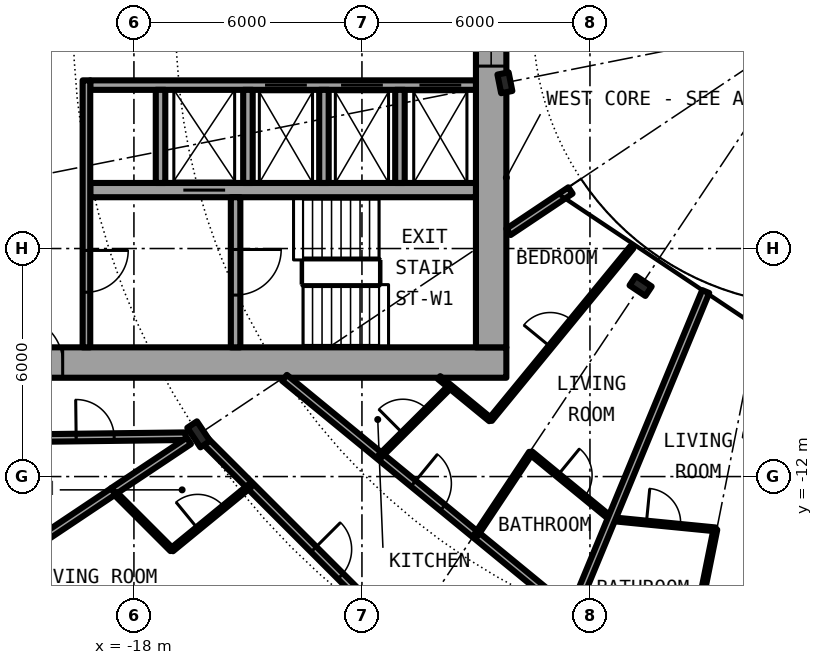
"""IFC4 building model, lengths in metres.
Left out: names, types, materials, properties, quantities, classifications, styles, units other than length and angle.
Written with IfcOpenShell. Run it as: python <this file> out.ifc"""

import sys

from ifc_helpers import new_model, si_unit, direction, frame, frame_2d, origin, origin_2d, place, context, subcontext, project, spatial, rectangle, i_section, extrude, element, fill, save


model = new_model("IFC4")
c1 = context("Model", 3, precision=1e-05, world=origin(), true_north=direction((0.0, 1.0)))
c2 = subcontext(c1, "Body", "Model", "MODEL_VIEW")
j1 = project(units=[si_unit("LENGTHUNIT", "METRE"), si_unit("PLANEANGLEUNIT", "RADIAN")], contexts=[c1])
p1 = place(None, origin())
s1 = spatial("IfcSite", under=j1, at=p1, CompositionType="ELEMENT")
p2 = place(p1, origin())
s2 = spatial("IfcBuilding", under=s1, at=p2, CompositionType="ELEMENT")
p3 = place(p2, frame((0.0, 0.0, 22.8)))
s3 = spatial("IfcBuildingStorey", under=s2, at=p3, CompositionType="ELEMENT", Elevation=22.8)
p4 = place(p3, frame((-16.297, -10.889, 0.0), z_axis=(0.0, 0.0, 1.0), x_axis=(-0.831469612303, -0.55557023302, 0.0)))
e1 = element("IfcColumn", 1, at=p4, inside=s3, PredefinedType="COLUMN", context=c2, shape_type="SweptSolid", body=[
    extrude(i_section(OverallWidth=0.305, OverallDepth=0.62, WebThickness=0.021, FlangeThickness=0.04, FilletRadius=0.027, at=origin_2d()), origin(), (0.0, 0.0, 1.0), 3.05),
])
for number, where, z_axis, x_axis in (
    (2, (-8.239, -1.639, 0.0), (0.0, 0.0, 1.0), (-0.981, -0.195, 0.0)),
    (3, (-4.667, -6.984, 0.0), (0.0, 0.0, 1.0), (-0.556, -0.831, 0.0)),
):
    element("IfcColumn", number, at=place(p3, frame(where, z_axis=z_axis, x_axis=x_axis)), inside=s3, PredefinedType="COLUMN", context=c2, shape_type="SweptSolid", body=[
        extrude(i_section(OverallWidth=0.3, OverallDepth=0.5, WebThickness=0.014, FlangeThickness=0.028, FilletRadius=0.027, at=origin_2d()), origin(), (0.0, 0.0, 1.0), 3.05),
    ])
p5 = place(p3, frame((-22.4, -9.0, 0.0), z_axis=(0.0, 0.0, 1.0), x_axis=(1.0, 0.0, 0.0)))
e4 = element("IfcWall", 4, at=p5, inside=s3, PredefinedType="SHEAR", context=c2, shape_type="SweptSolid", body=[
    extrude(rectangle(XDim=14.2, YDim=0.8, at=frame_2d((7.1, 0.0))), origin(), (0.0, 0.0, 1.0), 3.05),
])
p6 = place(p5, frame((1.325, 0.0, 0.0)))
e5 = element("IfcOpeningElement", 5, at=p6, cuts=e4, PredefinedType="OPENING", context=c2, shape_type="SweptSolid", body=[
    extrude(rectangle(XDim=1.2, YDim=2.3, at=frame_2d((0.6, 1.15))), frame((0.0, 0.41, 0.0), z_axis=(0.0, -1.0, 0.0), x_axis=(1.0, 0.0, 0.0)), (0.0, 0.0, 1.0), 0.82),
])
p7 = place(p3, frame((-8.6, 8.6, 0.0), z_axis=(0.0, 0.0, 1.0), x_axis=(0.0, -1.0, 0.0)))
e6 = element("IfcWall", 6, at=p7, inside=s3, PredefinedType="SHEAR", context=c2, shape_type="SweptSolid", body=[
    extrude(rectangle(XDim=17.2, YDim=0.8, at=frame_2d((8.6, 0.0))), origin(), (0.0, 0.0, 1.0), 3.05),
])
p8 = place(p7, frame((7.4, 0.0, 0.1)))
e7 = element("IfcOpeningElement", 7, at=p8, cuts=e6, PredefinedType="OPENING", context=c2, shape_type="SweptSolid", body=[
    extrude(rectangle(XDim=2.4, YDim=2.2, at=frame_2d((1.2, 1.1))), frame((0.0, 0.41, 0.0), z_axis=(0.0, -1.0, 0.0), x_axis=(1.0, 0.0, 0.0)), (0.0, 0.0, 1.0), 0.82),
])
p9 = place(p3, frame((-9.0, -1.7, 0.0), z_axis=(0.0, 0.0, 1.0), x_axis=(-1.0, 0.0, 0.0)))
e8 = element("IfcWall", 8, at=p9, inside=s3, PredefinedType="SHEAR", context=c2, shape_type="SweptSolid", body=[
    extrude(rectangle(XDim=10.15, YDim=0.25, at=frame_2d((5.075, 0.0))), origin(), (0.0, 0.0, 1.0), 3.05),
])
p10 = place(p9, frame((0.387, 0.0, 0.0)))
e9 = element("IfcOpeningElement", 9, at=p10, cuts=e8, PredefinedType="OPENING", context=c2, shape_type="SweptSolid", body=[
    extrude(rectangle(XDim=1.1, YDim=2.3, at=frame_2d((0.55, 1.15))), frame((0.0, 0.135, 0.0), z_axis=(0.0, -1.0, 0.0), x_axis=(1.0, 0.0, 0.0)), (0.0, 0.0, 1.0), 0.27),
])
p11 = place(p9, frame((2.45, 0.0, 0.0)))
e10 = element("IfcOpeningElement", 10, at=p11, cuts=e8, PredefinedType="OPENING", context=c2, shape_type="SweptSolid", body=[
    extrude(rectangle(XDim=1.1, YDim=2.3, at=frame_2d((0.55, 1.15))), frame((0.0, 0.135, 0.0), z_axis=(0.0, -1.0, 0.0), x_axis=(1.0, 0.0, 0.0)), (0.0, 0.0, 1.0), 0.27),
])
p12 = place(p9, frame((4.45, 0.0, 0.0)))
e11 = element("IfcOpeningElement", 11, at=p12, cuts=e8, PredefinedType="OPENING", context=c2, shape_type="SweptSolid", body=[
    extrude(rectangle(XDim=1.1, YDim=2.3, at=frame_2d((0.55, 1.15))), frame((0.0, 0.135, 0.0), z_axis=(0.0, -1.0, 0.0), x_axis=(1.0, 0.0, 0.0)), (0.0, 0.0, 1.0), 0.27),
])
p13 = place(p3, frame((-9.0, -4.462, 0.0), z_axis=(0.0, 0.0, 1.0), x_axis=(-1.0, 0.0, 0.0)))
e12 = element("IfcWall", 12, at=p13, inside=s3, PredefinedType="SHEAR", context=c2, shape_type="SweptSolid", body=[
    extrude(rectangle(XDim=10.15, YDim=0.375, at=frame_2d((5.075, 0.0))), origin(), (0.0, 0.0, 1.0), 3.05),
])
p14 = place(p13, frame((6.6, 0.0, 0.0)))
e13 = element("IfcOpeningElement", 13, at=p14, cuts=e12, PredefinedType="OPENING", context=c2, shape_type="SweptSolid", body=[
    extrude(rectangle(XDim=1.1, YDim=2.3, at=frame_2d((0.55, 1.15))), frame((0.0, 0.198, 0.0), z_axis=(0.0, -1.0, 0.0), x_axis=(1.0, 0.0, 0.0)), (0.0, 0.0, 1.0), 0.395),
])
p15 = place(p3, frame((-15.325, -4.65, 0.0), z_axis=(0.0, 0.0, 1.0), x_axis=(0.0, -1.0, 0.0)))
e14 = element("IfcWall", 14, at=p15, inside=s3, PredefinedType="SHEAR", context=c2, shape_type="SweptSolid", body=[
    extrude(rectangle(XDim=3.95, YDim=0.25, at=frame_2d((1.975, 0.0))), origin(), (0.0, 0.0, 1.0), 3.05),
])
p16 = place(p15, frame((1.375, 0.0, 0.0)))
e15 = element("IfcOpeningElement", 15, at=p16, cuts=e14, PredefinedType="OPENING", context=c2, shape_type="SweptSolid", body=[
    extrude(rectangle(XDim=1.2, YDim=2.3, at=frame_2d((0.6, 1.15))), frame((0.0, 0.135, 0.0), z_axis=(0.0, -1.0, 0.0), x_axis=(1.0, 0.0, 0.0)), (0.0, 0.0, 1.0), 0.27),
])
for number, where, z_axis, x_axis in (
    (16, (-15.0, -1.825, 0.0), (0.0, 0.0, 1.0), (0.0, -1.0, 0.0)),
    (17, (-17.3, -1.825, 0.0), (0.0, 0.0, 1.0), (0.0, -1.0, 0.0)),
):
    element("IfcWall", number, at=place(p3, frame(where, z_axis=z_axis, x_axis=x_axis)), inside=s3, PredefinedType="SOLIDWALL", context=c2, shape_type="SweptSolid", body=[
        extrude(rectangle(XDim=2.45, YDim=0.25, at=frame_2d((1.225, 0.0))), origin(), (0.0, 0.0, 1.0), 2.7),
    ])
p17 = place(p3, frame((-19.25, -1.575, 0.0), z_axis=(0.0, 0.0, 1.0), x_axis=(0.0, -1.0, 0.0)))
e18 = element("IfcWall", 18, at=p17, inside=s3, PredefinedType="SOLIDWALL", context=c2, shape_type="SweptSolid", body=[
    extrude(rectangle(XDim=7.025, YDim=0.2, at=frame_2d((3.513, 0.0))), origin(), (0.0, 0.0, 1.0), 2.7),
])
p18 = place(p17, frame((4.475, 0.0, 0.0)))
e19 = element("IfcOpeningElement", 19, at=p18, cuts=e18, PredefinedType="OPENING", context=c2, shape_type="SweptSolid", body=[
    extrude(rectangle(XDim=1.1, YDim=2.3, at=frame_2d((0.55, 1.15))), frame((0.0, 0.11, 0.0), z_axis=(0.0, -1.0, 0.0), x_axis=(1.0, 0.0, 0.0)), (0.0, 0.0, 1.0), 0.22),
])
for number, where, z_axis, x_axis in (
    (20, (-11.0, -1.825, 0.0), (0.0, 0.0, 1.0), (0.0, -1.0, 0.0)),
    (21, (-13.0, -1.825, 0.0), (0.0, 0.0, 1.0), (0.0, -1.0, 0.0)),
):
    element("IfcWall", number, at=place(p3, frame(where, z_axis=z_axis, x_axis=x_axis)), inside=s3, PredefinedType="SOLIDWALL", context=c2, shape_type="SweptSolid", body=[
        extrude(rectangle(XDim=2.45, YDim=0.25, at=frame_2d((1.225, 0.0))), origin(), (0.0, 0.0, 1.0), 2.7),
    ])
p19 = place(p3, frame((-18.542, -12.389, 0.0), z_axis=(0.0, 0.0, 1.0), x_axis=(0.707106781187, -0.707106781187, 0.0)))
e22 = element("IfcWall", 22, at=p19, inside=s3, PredefinedType="PARTITIONING", context=c2, shape_type="SweptSolid", body=[
    extrude(rectangle(XDim=2.175, YDim=0.1, at=frame_2d((1.088, 0.0))), origin(), (0.0, 0.0, 1.0), 2.7),
])
p20 = place(p3, frame((-16.187, -10.999, 0.0), z_axis=(0.0, 0.0, 1.0), x_axis=(0.707106781187, -0.707106781187, 0.0)))
e23 = element("IfcWall", 23, at=p20, inside=s3, PredefinedType="PARTITIONING", context=c2, shape_type="SweptSolid", body=[
    extrude(rectangle(XDim=7.337, YDim=0.2, at=frame_2d((3.668, 0.0))), origin(), (0.0, 0.0, 1.0), 2.38),
])
p21 = place(p20, frame((4.124, 0.0, 0.0)))
e24 = element("IfcOpeningElement", 24, at=p21, cuts=e23, PredefinedType="OPENING", context=c2, shape_type="SweptSolid", body=[
    extrude(rectangle(XDim=1.0, YDim=2.3, at=frame_2d((0.5, 1.15))), frame((0.0, 0.11, 0.0), z_axis=(0.0, -1.0, 0.0), x_axis=(1.0, 0.0, 0.0)), (0.0, 0.0, 1.0), 0.22),
])
p22 = place(p3, frame((-14.038, -9.402, 0.0), z_axis=(0.0, 0.0, 1.0), x_axis=(0.773084654695, -0.634302858794, 0.0)))
e25 = element("IfcWall", 25, at=p22, inside=s3, PredefinedType="PARTITIONING", context=c2, shape_type="SweptSolid", body=[
    extrude(rectangle(XDim=9.793, YDim=0.2, at=frame_2d((4.896, 0.0))), origin(), (0.0, 0.0, 1.0), 2.7),
])
p23 = place(p22, frame((4.387, 0.0, 0.0)))
e26 = element("IfcOpeningElement", 26, at=p23, cuts=e25, PredefinedType="OPENING", context=c2, shape_type="SweptSolid", body=[
    extrude(rectangle(XDim=1.0, YDim=2.3, at=frame_2d((0.5, 1.15))), frame((0.0, 0.11, 0.0), z_axis=(0.0, -1.0, 0.0), x_axis=(1.0, 0.0, 0.0)), (0.0, 0.0, 1.0), 0.22),
])
p24 = place(p3, frame((-9.971, -9.396, 0.0), z_axis=(0.0, 0.0, 1.0), x_axis=(0.77321028337, -0.634149712363, 0.0)))
e27 = element("IfcWall", 27, at=p24, inside=s3, PredefinedType="PARTITIONING", context=c2, shape_type="SweptSolid", body=[
    extrude(rectangle(XDim=1.749, YDim=0.1, at=frame_2d((0.874, 0.0))), origin(), (0.0, 0.0, 1.0), 2.7),
])
p25 = place(p3, frame((-7.558, -11.376, 0.0), z_axis=(0.0, 0.0, 1.0), x_axis=(0.773049907698, -0.634345205868, 0.0)))
e28 = element("IfcWall", 28, at=p25, inside=s3, PredefinedType="PARTITIONING", context=c2, shape_type="SweptSolid", body=[
    extrude(rectangle(XDim=2.748, YDim=0.1, at=frame_2d((1.374, 0.0))), origin(), (0.0, 0.0, 1.0), 2.7),
])
p26 = place(p25, frame((0.924, 0.0, 0.0)))
e29 = element("IfcOpeningElement", 29, at=p26, cuts=e28, PredefinedType="OPENING", context=c2, shape_type="SweptSolid", body=[
    extrude(rectangle(XDim=0.9, YDim=2.3, at=frame_2d((0.45, 1.15))), frame((0.0, 0.06, 0.0), z_axis=(0.0, -1.0, 0.0), x_axis=(1.0, 0.0, 0.0)), (0.0, 0.0, 1.0), 0.12),
])
p27 = place(p3, frame((-5.434, -13.12, 0.0), z_axis=(0.0, 0.0, 1.0), x_axis=(0.99520549403, -0.097806056318, 0.0)))
e30 = element("IfcWall", 30, at=p27, inside=s3, PredefinedType="PARTITIONING", context=c2, shape_type="SweptSolid", body=[
    extrude(rectangle(XDim=2.748, YDim=0.1, at=frame_2d((1.374, 0.0))), origin(), (0.0, 0.0, 1.0), 2.7),
])
p28 = place(p27, frame((0.924, 0.0, 0.0)))
e31 = element("IfcOpeningElement", 31, at=p28, cuts=e30, PredefinedType="OPENING", context=c2, shape_type="SweptSolid", body=[
    extrude(rectangle(XDim=0.9, YDim=2.3, at=frame_2d((0.45, 1.15))), frame((0.0, 0.06, 0.0), z_axis=(0.0, -1.0, 0.0), x_axis=(1.0, 0.0, 0.0)), (0.0, 0.0, 1.0), 0.12),
])
p29 = place(p3, frame((-21.675, -11.0, 0.0), z_axis=(0.0, 0.0, 1.0), x_axis=(0.99992425795, 0.012307654658, 0.0)))
e32 = element("IfcWall", 32, at=p29, inside=s3, PredefinedType="PARTITIONING", context=c2, shape_type="SweptSolid", body=[
    extrude(rectangle(XDim=5.039, YDim=0.2, at=frame_2d((2.519, 0.0))), origin(), (0.0, 0.0, 1.0), 2.7),
])
p30 = place(p29, frame((2.155, 0.0, 0.0)))
e33 = element("IfcOpeningElement", 33, at=p30, cuts=e32, PredefinedType="OPENING", context=c2, shape_type="SweptSolid", body=[
    extrude(rectangle(XDim=1.0, YDim=2.3, at=frame_2d((0.5, 1.15))), frame((0.0, 0.11, 0.0), z_axis=(0.0, -1.0, 0.0), x_axis=(1.0, 0.0, 0.0)), (0.0, 0.0, 1.0), 0.22),
])
p31 = place(p3, frame((-6.513, -4.472, 0.0), z_axis=(0.0, 0.0, 1.0), x_axis=(-0.831417956244, -0.555647533996, 0.0)))
e34 = element("IfcWall", 34, at=p31, inside=s3, PredefinedType="PARTITIONING", context=c2, shape_type="SweptSolid", body=[
    extrude(rectangle(XDim=1.962, YDim=0.2, at=frame_2d((0.981, 0.0))), origin(), (0.0, 0.0, 1.0), 2.7),
])
p32 = place(p3, frame((-18.544, -12.387, 0.0), z_axis=(0.0, 0.0, 1.0), x_axis=(0.832066006555, 0.554676627176, 0.0)))
e35 = element("IfcWall", 35, at=p32, inside=s3, PredefinedType="PARTITIONING", context=c2, shape_type="SweptSolid", body=[
    extrude(rectangle(XDim=2.39, YDim=0.2, at=frame_2d((1.195, 0.0))), origin(), (0.0, 0.0, 1.0), 2.7),
])
p33 = place(p3, frame((-22.595, -15.098, 0.0), z_axis=(0.0, 0.0, 1.0), x_axis=(0.831387096605, 0.55569370664, 0.0)))
e36 = element("IfcWall", 36, at=p33, inside=s3, PredefinedType="PARTITIONING", context=c2, shape_type="SweptSolid", body=[
    extrude(rectangle(XDim=4.875, YDim=0.2, at=frame_2d((2.438, 0.0))), origin(), (0.0, 0.0, 1.0), 2.7),
])
p34 = place(p3, frame((-17.004, -13.927, 0.0), z_axis=(0.0, 0.0, 1.0), x_axis=(0.77367517848, 0.633582447834, 0.0)))
e37 = element("IfcWall", 37, at=p34, inside=s3, PredefinedType="PARTITIONING", context=c2, shape_type="SweptSolid", body=[
    extrude(rectangle(XDim=2.661, YDim=0.1, at=frame_2d((1.331, 0.0))), origin(), (0.0, 0.0, 1.0), 2.7),
])
p35 = place(p34, frame((0.881, 0.0, 0.0)))
e38 = element("IfcOpeningElement", 38, at=p35, cuts=e37, PredefinedType="OPENING", context=c2, shape_type="SweptSolid", body=[
    extrude(rectangle(XDim=0.9, YDim=2.3, at=frame_2d((0.45, 1.15))), frame((0.0, 0.06, 0.0), z_axis=(0.0, -1.0, 0.0), x_axis=(1.0, 0.0, 0.0)), (0.0, 0.0, 1.0), 0.12),
])
p36 = place(p3, frame((-11.524, -11.464, 0.0), z_axis=(0.0, 0.0, 1.0), x_axis=(0.708796844581, 0.705412668665, 0.0)))
e39 = element("IfcWall", 39, at=p36, inside=s3, PredefinedType="PARTITIONING", context=c2, shape_type="SweptSolid", body=[
    extrude(rectangle(XDim=2.597, YDim=0.1, at=frame_2d((1.299, 0.0))), origin(), (0.0, 0.0, 1.0), 2.7),
])
p37 = place(p36, frame((0.849, 0.0, 0.0)))
e40 = element("IfcOpeningElement", 40, at=p37, cuts=e39, PredefinedType="OPENING", context=c2, shape_type="SweptSolid", body=[
    extrude(rectangle(XDim=0.9, YDim=2.3, at=frame_2d((0.45, 1.15))), frame((0.0, 0.06, 0.0), z_axis=(0.0, -1.0, 0.0), x_axis=(1.0, 0.0, 0.0)), (0.0, 0.0, 1.0), 0.12),
])
p38 = place(p3, frame((-8.996, -13.539, 0.0), z_axis=(0.0, 0.0, 1.0), x_axis=(0.553615197403, 0.83277260594, 0.0)))
e41 = element("IfcWall", 41, at=p38, inside=s3, PredefinedType="PARTITIONING", context=c2, shape_type="SweptSolid", body=[
    extrude(rectangle(XDim=2.597, YDim=0.1, at=frame_2d((1.299, 0.0))), origin(), (0.0, 0.0, 1.0), 2.7),
])
p39 = place(p3, frame((-8.62, -10.504, 0.0), z_axis=(0.0, 0.0, 1.0), x_axis=(0.634358693064, 0.773038840249, 0.0)))
e42 = element("IfcWall", 42, at=p39, inside=s3, PredefinedType="PARTITIONING", context=c2, shape_type="SweptSolid", body=[
    extrude(rectangle(XDim=5.868, YDim=0.1, at=frame_2d((2.934, 0.0))), origin(), (0.0, 0.0, 1.0), 2.7),
])
p40 = place(p39, frame((2.484, 0.0, 0.0)))
e43 = element("IfcOpeningElement", 43, at=p40, cuts=e42, PredefinedType="OPENING", context=c2, shape_type="SweptSolid", body=[
    extrude(rectangle(XDim=0.9, YDim=2.3, at=frame_2d((0.45, 1.15))), frame((0.0, 0.06, 0.0), z_axis=(0.0, -1.0, 0.0), x_axis=(1.0, 0.0, 0.0)), (0.0, 0.0, 1.0), 0.12),
])
p41 = place(p3, frame((-6.467, -15.614, 0.0), z_axis=(0.0, 0.0, 1.0), x_axis=(0.382646942224, 0.923894646378, 0.0)))
e44 = element("IfcWall", 44, at=p41, inside=s3, PredefinedType="PARTITIONING", context=c2, shape_type="SweptSolid", body=[
    extrude(rectangle(XDim=9.181, YDim=0.2, at=frame_2d((4.59, 0.0))), origin(), (0.0, 0.0, 1.0), 2.7),
])
p42 = place(p3, frame((-3.213, -15.934, 0.0), z_axis=(0.0, 0.0, 1.0), x_axis=(0.197851046463, 0.980232096706, 0.0)))
e45 = element("IfcWall", 45, at=p42, inside=s3, PredefinedType="PARTITIONING", context=c2, shape_type="SweptSolid", body=[
    extrude(rectangle(XDim=2.597, YDim=0.1, at=frame_2d((1.299, 0.0))), origin(), (0.0, 0.0, 1.0), 2.7),
])
p43 = place(p10, origin())
e46 = element("IfcDoor", 46, at=p43, inside=s3, OperationType="DOUBLE_DOOR_SLIDING", PredefinedType="DOOR", context=c2, shape_type="SweptSolid", body=[
    extrude(rectangle(XDim=1.1, YDim=2.3, at=frame_2d((0.55, 1.15))), frame((0.0, 0.025, 0.0), z_axis=(0.0, -1.0, 0.0), x_axis=(1.0, 0.0, 0.0)), (0.0, 0.0, 1.0), 0.05),
])
fill(e9, e46)
p44 = place(p11, origin())
e47 = element("IfcDoor", 47, at=p44, inside=s3, OperationType="DOUBLE_DOOR_SLIDING", PredefinedType="DOOR", context=c2, shape_type="SweptSolid", body=[
    extrude(rectangle(XDim=1.1, YDim=2.3, at=frame_2d((0.55, 1.15))), frame((0.0, 0.025, 0.0), z_axis=(0.0, -1.0, 0.0), x_axis=(1.0, 0.0, 0.0)), (0.0, 0.0, 1.0), 0.05),
])
fill(e10, e47)
p45 = place(p12, origin())
e48 = element("IfcDoor", 48, at=p45, inside=s3, OperationType="DOUBLE_DOOR_SLIDING", PredefinedType="DOOR", context=c2, shape_type="SweptSolid", body=[
    extrude(rectangle(XDim=1.1, YDim=2.3, at=frame_2d((0.55, 1.15))), frame((0.0, 0.025, 0.0), z_axis=(0.0, -1.0, 0.0), x_axis=(1.0, 0.0, 0.0)), (0.0, 0.0, 1.0), 0.05),
])
fill(e11, e48)
p46 = place(p14, origin())
e49 = element("IfcDoor", 49, at=p46, inside=s3, OperationType="DOUBLE_DOOR_SLIDING", PredefinedType="DOOR", context=c2, shape_type="SweptSolid", body=[
    extrude(rectangle(XDim=1.1, YDim=2.3, at=frame_2d((0.55, 1.15))), frame((0.0, 0.025, 0.0), z_axis=(0.0, -1.0, 0.0), x_axis=(1.0, 0.0, 0.0)), (0.0, 0.0, 1.0), 0.05),
])
fill(e13, e49)
p47 = place(p16, origin())
e50 = element("IfcDoor", 50, at=p47, inside=s3, OperationType="SINGLE_SWING_LEFT", PredefinedType="DOOR", context=c2, shape_type="SweptSolid", body=[
    extrude(rectangle(XDim=1.2, YDim=2.3, at=frame_2d((0.6, 1.15))), frame((0.0, 0.025, 0.0), z_axis=(0.0, -1.0, 0.0), x_axis=(1.0, 0.0, 0.0)), (0.0, 0.0, 1.0), 0.05),
])
fill(e15, e50)
p48 = place(p18, origin())
e51 = element("IfcDoor", 51, at=p48, inside=s3, OperationType="SINGLE_SWING_LEFT", PredefinedType="DOOR", context=c2, shape_type="SweptSolid", body=[
    extrude(rectangle(XDim=1.1, YDim=2.3, at=frame_2d((0.55, 1.15))), frame((0.0, 0.025, 0.0), z_axis=(0.0, -1.0, 0.0), x_axis=(1.0, 0.0, 0.0)), (0.0, 0.0, 1.0), 0.05),
])
fill(e19, e51)
p49 = place(p6, origin())
e52 = element("IfcDoor", 52, at=p49, inside=s3, OperationType="SINGLE_SWING_RIGHT", PredefinedType="DOOR", context=c2, shape_type="SweptSolid", body=[
    extrude(rectangle(XDim=1.2, YDim=2.3, at=frame_2d((0.6, 1.15))), frame((0.0, 0.025, 0.0), z_axis=(0.0, -1.0, 0.0), x_axis=(1.0, 0.0, 0.0)), (0.0, 0.0, 1.0), 0.05),
])
fill(e5, e52)
p50 = place(p8, origin())
e53 = element("IfcWindow", 53, at=p50, inside=s3, PartitioningType="SINGLE_PANEL", PredefinedType="WINDOW", context=c2, shape_type="SweptSolid", body=[
    extrude(rectangle(XDim=2.4, YDim=2.2, at=frame_2d((1.2, 1.1))), frame((0.0, 0.03, 0.0), z_axis=(0.0, -1.0, 0.0), x_axis=(1.0, 0.0, 0.0)), (0.0, 0.0, 1.0), 0.06),
])
fill(e7, e53)
p51 = place(p21, origin())
e54 = element("IfcDoor", 54, at=p51, inside=s3, OperationType="SINGLE_SWING_RIGHT", PredefinedType="DOOR", context=c2, shape_type="SweptSolid", body=[
    extrude(rectangle(XDim=1.0, YDim=2.3, at=frame_2d((0.5, 1.15))), frame((0.0, 0.025, 0.0), z_axis=(0.0, -1.0, 0.0), x_axis=(1.0, 0.0, 0.0)), (0.0, 0.0, 1.0), 0.05),
])
fill(e24, e54)
p52 = place(p35, origin())
e55 = element("IfcDoor", 55, at=p52, inside=s3, OperationType="SINGLE_SWING_RIGHT", PredefinedType="DOOR", context=c2, shape_type="SweptSolid", body=[
    extrude(rectangle(XDim=0.9, YDim=2.3, at=frame_2d((0.45, 1.15))), frame((0.0, 0.025, 0.0), z_axis=(0.0, -1.0, 0.0), x_axis=(1.0, 0.0, 0.0)), (0.0, 0.0, 1.0), 0.05),
])
fill(e38, e55)
p53 = place(p23, origin())
e56 = element("IfcDoor", 56, at=p53, inside=s3, OperationType="SINGLE_SWING_LEFT", PredefinedType="DOOR", context=c2, shape_type="SweptSolid", body=[
    extrude(rectangle(XDim=1.0, YDim=2.3, at=frame_2d((0.5, 1.15))), frame((0.0, 0.025, 0.0), z_axis=(0.0, -1.0, 0.0), x_axis=(1.0, 0.0, 0.0)), (0.0, 0.0, 1.0), 0.05),
])
fill(e26, e56)
p54 = place(p26, origin())
e57 = element("IfcDoor", 57, at=p54, inside=s3, OperationType="SINGLE_SWING_LEFT", PredefinedType="DOOR", context=c2, shape_type="SweptSolid", body=[
    extrude(rectangle(XDim=0.9, YDim=2.3, at=frame_2d((0.45, 1.15))), frame((0.0, 0.025, 0.0), z_axis=(0.0, -1.0, 0.0), x_axis=(1.0, 0.0, 0.0)), (0.0, 0.0, 1.0), 0.05),
])
fill(e29, e57)
p55 = place(p37, origin())
e58 = element("IfcDoor", 58, at=p55, inside=s3, OperationType="SINGLE_SWING_RIGHT", PredefinedType="DOOR", context=c2, shape_type="SweptSolid", body=[
    extrude(rectangle(XDim=0.9, YDim=2.3, at=frame_2d((0.45, 1.15))), frame((0.0, 0.025, 0.0), z_axis=(0.0, -1.0, 0.0), x_axis=(1.0, 0.0, 0.0)), (0.0, 0.0, 1.0), 0.05),
])
fill(e40, e58)
p56 = place(p40, origin())
e59 = element("IfcDoor", 59, at=p56, inside=s3, OperationType="SINGLE_SWING_RIGHT", PredefinedType="DOOR", context=c2, shape_type="SweptSolid", body=[
    extrude(rectangle(XDim=0.9, YDim=2.3, at=frame_2d((0.45, 1.15))), frame((0.0, 0.025, 0.0), z_axis=(0.0, -1.0, 0.0), x_axis=(1.0, 0.0, 0.0)), (0.0, 0.0, 1.0), 0.05),
])
fill(e43, e59)
p57 = place(p28, origin())
e60 = element("IfcDoor", 60, at=p57, inside=s3, OperationType="SINGLE_SWING_LEFT", PredefinedType="DOOR", context=c2, shape_type="SweptSolid", body=[
    extrude(rectangle(XDim=0.9, YDim=2.3, at=frame_2d((0.45, 1.15))), frame((0.0, 0.025, 0.0), z_axis=(0.0, -1.0, 0.0), x_axis=(1.0, 0.0, 0.0)), (0.0, 0.0, 1.0), 0.05),
])
fill(e31, e60)
p58 = place(p30, origin())
e61 = element("IfcDoor", 61, at=p58, inside=s3, OperationType="SINGLE_SWING_RIGHT", PredefinedType="DOOR", context=c2, shape_type="SweptSolid", body=[
    extrude(rectangle(XDim=1.0, YDim=2.3, at=frame_2d((0.5, 1.15))), frame((0.0, 0.025, 0.0), z_axis=(0.0, -1.0, 0.0), x_axis=(1.0, 0.0, 0.0)), (0.0, 0.0, 1.0), 0.05),
])
fill(e33, e61)
save(model, sys.argv[1])
